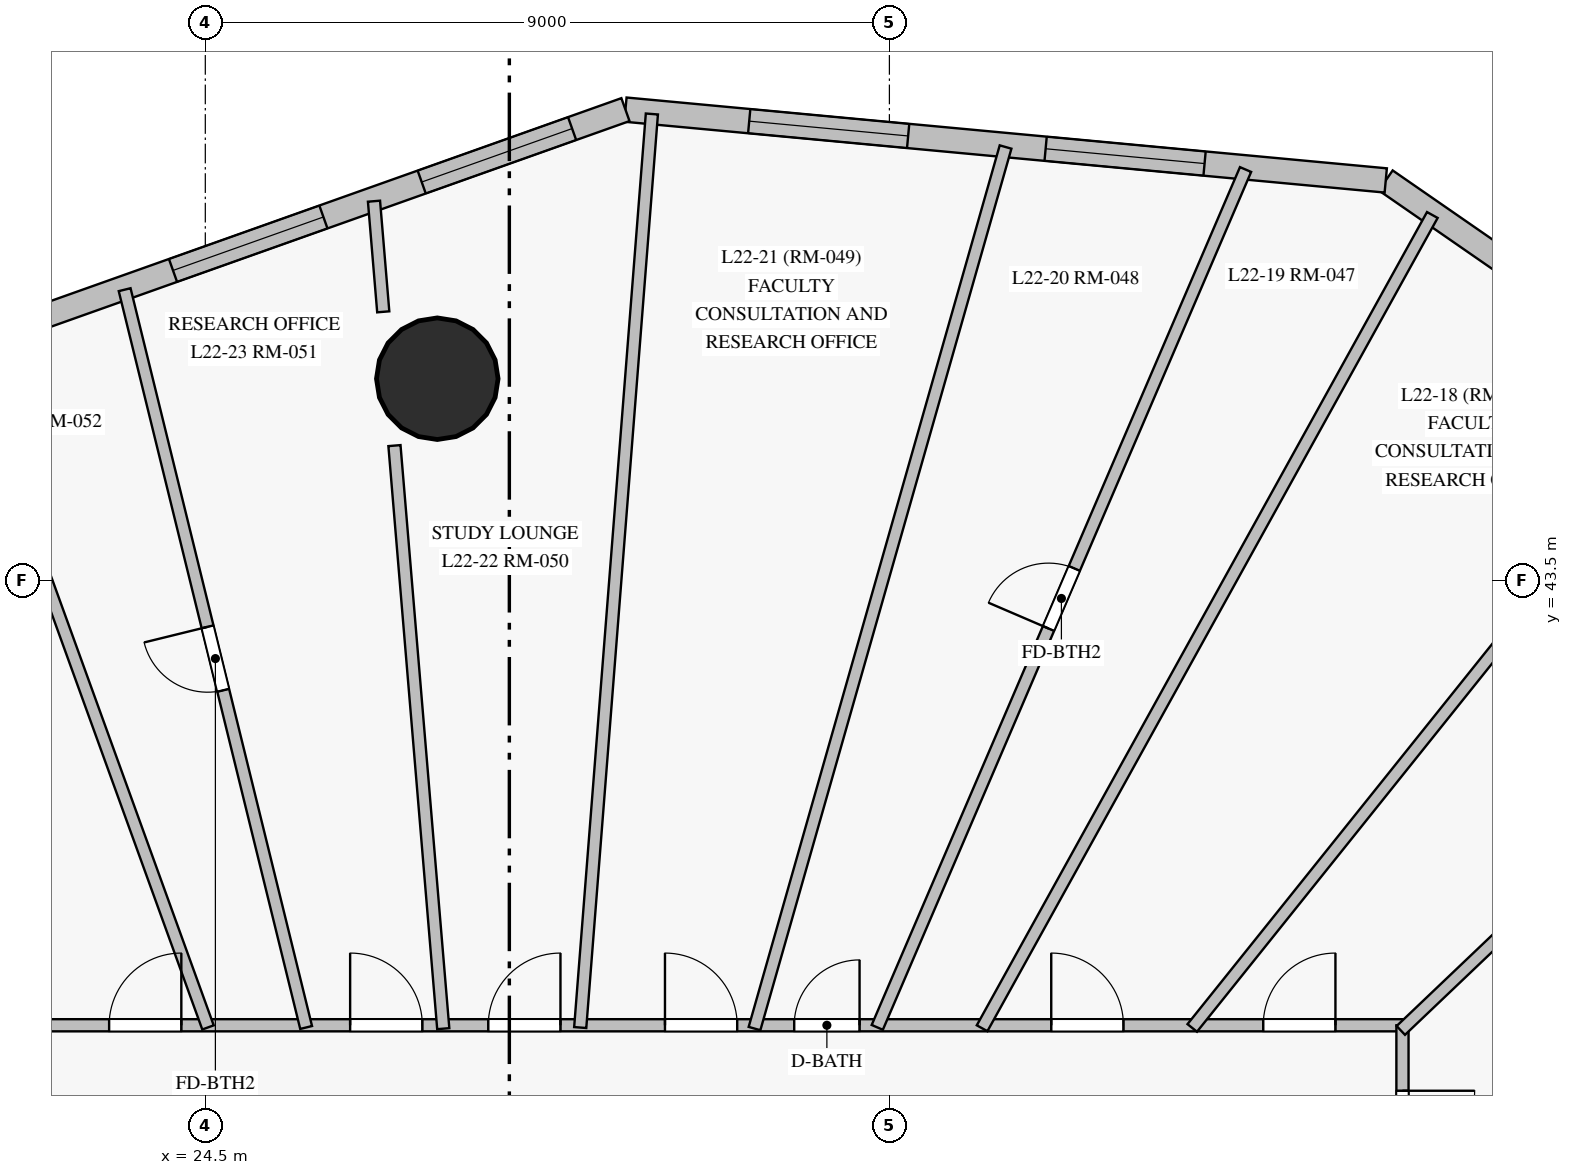
"""IFC4 building model, lengths in metres.
Left out: names, types, materials, properties, quantities, classifications, styles, units other than length and angle.
Written with IfcOpenShell. Run it as: python <this file> out.ifc"""

import sys

from ifc_helpers import new_model, si_unit, direction, frame, frame_2d, origin, origin_with_axes, origin_2d, place, context, subcontext, project, spatial, rectangle, circle, extrude, source, transform, mapped, element, fill, save


model = new_model("IFC4")
c1 = context("Model", 3, precision=1e-05, world=origin(), true_north=direction((0.0, 1.0)))
c2 = subcontext(c1, "Body", "Model", "MODEL_VIEW")
j1 = project(units=[si_unit("LENGTHUNIT", "METRE"), si_unit("PLANEANGLEUNIT", "RADIAN")], contexts=[c1])
p1 = place(None, origin())
s1 = spatial("IfcSite", under=j1, at=p1, CompositionType="ELEMENT")
p2 = place(p1, origin())
s2 = spatial("IfcBuilding", under=s1, at=p2, CompositionType="ELEMENT")
p3 = place(p2, frame((0.0, 0.0, 84.1)))
s3 = spatial("IfcBuildingStorey", under=s2, at=p3, CompositionType="ELEMENT", Elevation=84.1)
m1 = source(origin_with_axes(), c2, "Body", "SweptSolid", [
    extrude(circle(Radius=0.8, at=origin_2d()), origin(), (0.0, 0.0, 1.0), 3.6),
])
p4 = place(p3, frame((27.552, 46.156, 0.0), z_axis=(0.0, 0.0, 1.0), x_axis=(1.0, 0.0, 0.0)))
e1 = element("IfcColumn", 1, at=p4, inside=s3, PredefinedType="COLUMN", context=c2, shape_type="MappedRepresentation", body=[
    mapped(m1, transform((0.0, 0.0, 0.0), scale=1.0)),
])
p5 = place(p3, frame((50.307, 41.653, 0.0), z_axis=(0.0, 0.0, 1.0), x_axis=(-0.822301884345, 0.569051501187, 0.0)))
e2 = element("IfcWall", 2, at=p5, inside=s3, PredefinedType="SOLIDWALL", context=c2, shape_type="SweptSolid", body=[
    extrude(rectangle(XDim=12.498, YDim=0.32, at=frame_2d((6.249, 0.0))), origin(), (0.0, 0.0, 1.0), 3.325),
])
p6 = place(p5, frame((1.102, 0.0, 0.85)))
e3 = element("IfcOpeningElement", 3, at=p6, cuts=e2, PredefinedType="OPENING", context=c2, shape_type="SweptSolid", body=[
    extrude(rectangle(XDim=2.1, YDim=1.95, at=frame_2d((1.05, 0.975))), frame((0.0, 0.17, 0.0), z_axis=(0.0, -1.0, 0.0), x_axis=(1.0, 0.0, 0.0)), (0.0, 0.0, 1.0), 0.34),
])
p7 = place(p5, frame((4.751, 0.0, 0.85)))
e4 = element("IfcOpeningElement", 4, at=p7, cuts=e2, PredefinedType="OPENING", context=c2, shape_type="SweptSolid", body=[
    extrude(rectangle(XDim=2.1, YDim=1.95, at=frame_2d((1.05, 0.975))), frame((0.0, 0.17, 0.0), z_axis=(0.0, -1.0, 0.0), x_axis=(1.0, 0.0, 0.0)), (0.0, 0.0, 1.0), 0.34),
])
p8 = place(p5, frame((8.568, 0.0, 0.85)))
e5 = element("IfcOpeningElement", 5, at=p8, cuts=e2, PredefinedType="OPENING", context=c2, shape_type="SweptSolid", body=[
    extrude(rectangle(XDim=2.1, YDim=1.95, at=frame_2d((1.05, 0.975))), frame((0.0, 0.17, 0.0), z_axis=(0.0, -1.0, 0.0), x_axis=(1.0, 0.0, 0.0)), (0.0, 0.0, 1.0), 0.34),
])
p9 = place(p3, frame((40.03, 48.765, 0.0), z_axis=(0.0, 0.0, 1.0), x_axis=(-0.995690576349, 0.092737673949, 0.0)))
e6 = element("IfcWall", 6, at=p9, inside=s3, PredefinedType="SOLIDWALL", context=c2, shape_type="SweptSolid", body=[
    extrude(rectangle(XDim=10.046, YDim=0.32, at=frame_2d((5.023, 0.0))), origin(), (0.0, 0.0, 1.0), 3.325),
])
p10 = place(p9, frame((2.394, 0.0, 0.85)))
e7 = element("IfcOpeningElement", 7, at=p10, cuts=e6, PredefinedType="OPENING", context=c2, shape_type="SweptSolid", body=[
    extrude(rectangle(XDim=2.1, YDim=1.95, at=frame_2d((1.05, 0.975))), frame((0.0, 0.17, 0.0), z_axis=(0.0, -1.0, 0.0), x_axis=(1.0, 0.0, 0.0)), (0.0, 0.0, 1.0), 0.34),
])
p11 = place(p9, frame((6.311, 0.0, 0.85)))
e8 = element("IfcOpeningElement", 8, at=p11, cuts=e6, PredefinedType="OPENING", context=c2, shape_type="SweptSolid", body=[
    extrude(rectangle(XDim=2.1, YDim=1.95, at=frame_2d((1.05, 0.975))), frame((0.0, 0.17, 0.0), z_axis=(0.0, -1.0, 0.0), x_axis=(1.0, 0.0, 0.0)), (0.0, 0.0, 1.0), 0.34),
])
p12 = place(p3, frame((30.027, 49.696, 0.0), z_axis=(0.0, 0.0, 1.0), x_axis=(-0.942240443112, -0.334937228991, 0.0)))
e9 = element("IfcWall", 9, at=p12, inside=s3, PredefinedType="SOLIDWALL", context=c2, shape_type="SweptSolid", body=[
    extrude(rectangle(XDim=14.562, YDim=0.32, at=frame_2d((7.281, 0.0))), origin(), (0.0, 0.0, 1.0), 3.325),
])
p13 = place(p12, frame((0.745, 0.0, 0.85)))
e10 = element("IfcOpeningElement", 10, at=p13, cuts=e9, PredefinedType="OPENING", context=c2, shape_type="SweptSolid", body=[
    extrude(rectangle(XDim=2.1, YDim=1.95, at=frame_2d((1.05, 0.975))), frame((0.0, 0.17, 0.0), z_axis=(0.0, -1.0, 0.0), x_axis=(1.0, 0.0, 0.0)), (0.0, 0.0, 1.0), 0.34),
])
p14 = place(p12, frame((4.217, 0.0, 0.85)))
e11 = element("IfcOpeningElement", 11, at=p14, cuts=e9, PredefinedType="OPENING", context=c2, shape_type="SweptSolid", body=[
    extrude(rectangle(XDim=2.1, YDim=1.95, at=frame_2d((1.05, 0.975))), frame((0.0, 0.17, 0.0), z_axis=(0.0, -1.0, 0.0), x_axis=(1.0, 0.0, 0.0)), (0.0, 0.0, 1.0), 0.34),
])
p15 = place(p12, frame((10.153, 0.0, 0.85)))
e12 = element("IfcOpeningElement", 12, at=p15, cuts=e9, PredefinedType="OPENING", context=c2, shape_type="SweptSolid", body=[
    extrude(rectangle(XDim=2.1, YDim=1.95, at=frame_2d((1.05, 0.975))), frame((0.0, 0.17, 0.0), z_axis=(0.0, -1.0, 0.0), x_axis=(1.0, 0.0, 0.0)), (0.0, 0.0, 1.0), 0.34),
])
p16 = place(p3, frame((10.5, 37.65, 0.0), z_axis=(0.0, 0.0, 1.0), x_axis=(1.0, 0.0, 0.0)))
e13 = element("IfcWall", 13, at=p16, inside=s3, PredefinedType="PARTITIONING", context=c2, shape_type="SweptSolid", body=[
    extrude(rectangle(XDim=29.75, YDim=0.16, at=frame_2d((14.875, 0.0))), origin(), (0.0, 0.0, 1.0), 2.725),
])
p17 = place(p16, frame((27.918, 0.0, 0.0)))
e14 = element("IfcOpeningElement", 14, at=p17, cuts=e13, PredefinedType="OPENING", context=c2, shape_type="SweptSolid", body=[
    extrude(rectangle(XDim=0.95, YDim=2.15, at=frame_2d((0.475, 1.075))), frame((0.0, 0.09, 0.0), z_axis=(0.0, -1.0, 0.0), x_axis=(1.0, 0.0, 0.0)), (0.0, 0.0, 1.0), 0.18),
])
p18 = place(p16, frame((25.129, 0.0, 0.0)))
e15 = element("IfcOpeningElement", 15, at=p18, cuts=e13, PredefinedType="OPENING", context=c2, shape_type="SweptSolid", body=[
    extrude(rectangle(XDim=0.95, YDim=2.15, at=frame_2d((0.475, 1.075))), frame((0.0, 0.09, 0.0), z_axis=(0.0, -1.0, 0.0), x_axis=(1.0, 0.0, 0.0)), (0.0, 0.0, 1.0), 0.18),
])
p19 = place(p16, frame((21.748, 0.0, 0.0)))
e16 = element("IfcOpeningElement", 16, at=p19, cuts=e13, PredefinedType="OPENING", context=c2, shape_type="SweptSolid", body=[
    extrude(rectangle(XDim=0.86, YDim=2.1, at=frame_2d((0.43, 1.05))), frame((0.0, 0.09, 0.0), z_axis=(0.0, -1.0, 0.0), x_axis=(1.0, 0.0, 0.0)), (0.0, 0.0, 1.0), 0.18),
])
p20 = place(p16, frame((20.048, 0.0, 0.0)))
e17 = element("IfcOpeningElement", 17, at=p20, cuts=e13, PredefinedType="OPENING", context=c2, shape_type="SweptSolid", body=[
    extrude(rectangle(XDim=0.95, YDim=2.15, at=frame_2d((0.475, 1.075))), frame((0.0, 0.09, 0.0), z_axis=(0.0, -1.0, 0.0), x_axis=(1.0, 0.0, 0.0)), (0.0, 0.0, 1.0), 0.18),
])
p21 = place(p16, frame((17.722, 0.0, 0.0)))
e18 = element("IfcOpeningElement", 18, at=p21, cuts=e13, PredefinedType="OPENING", context=c2, shape_type="SweptSolid", body=[
    extrude(rectangle(XDim=0.95, YDim=2.15, at=frame_2d((0.475, 1.075))), frame((0.0, 0.09, 0.0), z_axis=(0.0, -1.0, 0.0), x_axis=(1.0, 0.0, 0.0)), (0.0, 0.0, 1.0), 0.18),
])
p22 = place(p16, frame((15.906, 0.0, 0.0)))
e19 = element("IfcOpeningElement", 19, at=p22, cuts=e13, PredefinedType="OPENING", context=c2, shape_type="SweptSolid", body=[
    extrude(rectangle(XDim=0.95, YDim=2.15, at=frame_2d((0.475, 1.075))), frame((0.0, 0.09, 0.0), z_axis=(0.0, -1.0, 0.0), x_axis=(1.0, 0.0, 0.0)), (0.0, 0.0, 1.0), 0.18),
])
p23 = place(p16, frame((12.735, 0.0, 0.0)))
e20 = element("IfcOpeningElement", 20, at=p23, cuts=e13, PredefinedType="OPENING", context=c2, shape_type="SweptSolid", body=[
    extrude(rectangle(XDim=0.95, YDim=2.15, at=frame_2d((0.475, 1.075))), frame((0.0, 0.09, 0.0), z_axis=(0.0, -1.0, 0.0), x_axis=(1.0, 0.0, 0.0)), (0.0, 0.0, 1.0), 0.18),
])
p24 = place(p16, frame((10.11, 0.0, 0.0)))
e21 = element("IfcOpeningElement", 21, at=p24, cuts=e13, PredefinedType="OPENING", context=c2, shape_type="SweptSolid", body=[
    extrude(rectangle(XDim=0.95, YDim=2.15, at=frame_2d((0.475, 1.075))), frame((0.0, 0.09, 0.0), z_axis=(0.0, -1.0, 0.0), x_axis=(1.0, 0.0, 0.0)), (0.0, 0.0, 1.0), 0.18),
])
p25 = place(p16, frame((8.99, 0.0, 0.0)))
e22 = element("IfcOpeningElement", 22, at=p25, cuts=e13, PredefinedType="OPENING", context=c2, shape_type="SweptSolid", body=[
    extrude(rectangle(XDim=0.95, YDim=2.15, at=frame_2d((0.475, 1.075))), frame((0.0, 0.09, 0.0), z_axis=(0.0, -1.0, 0.0), x_axis=(1.0, 0.0, 0.0)), (0.0, 0.0, 1.0), 0.18),
])
p26 = place(p16, frame((7.897, 0.0, 0.0)))
e23 = element("IfcOpeningElement", 23, at=p26, cuts=e13, PredefinedType="OPENING", context=c2, shape_type="SweptSolid", body=[
    extrude(rectangle(XDim=0.95, YDim=2.15, at=frame_2d((0.475, 1.075))), frame((0.0, 0.09, 0.0), z_axis=(0.0, -1.0, 0.0), x_axis=(1.0, 0.0, 0.0)), (0.0, 0.0, 1.0), 0.18),
])
p27 = place(p3, frame((40.25, 37.65, 0.0), z_axis=(0.0, 0.0, 1.0), x_axis=(0.0, -1.0, 0.0)))
e24 = element("IfcWall", 24, at=p27, inside=s3, PredefinedType="PARTITIONING", context=c2, shape_type="SweptSolid", body=[
    extrude(rectangle(XDim=22.3, YDim=0.16, at=frame_2d((11.15, 0.0))), origin(), (0.0, 0.0, 1.0), 2.725),
])
p28 = place(p27, frame((16.25, 0.0, 0.0)))
e25 = element("IfcOpeningElement", 25, at=p28, cuts=e24, PredefinedType="OPENING", context=c2, shape_type="SweptSolid", body=[
    extrude(rectangle(XDim=0.95, YDim=2.15, at=frame_2d((0.475, 1.075))), frame((0.0, 0.09, 0.0), z_axis=(0.0, -1.0, 0.0), x_axis=(1.0, 0.0, 0.0)), (0.0, 0.0, 1.0), 0.18),
])
p29 = place(p27, frame((11.165, 0.0, 0.0)))
e26 = element("IfcOpeningElement", 26, at=p29, cuts=e24, PredefinedType="OPENING", context=c2, shape_type="SweptSolid", body=[
    extrude(rectangle(XDim=0.95, YDim=2.15, at=frame_2d((0.475, 1.075))), frame((0.0, 0.09, 0.0), z_axis=(0.0, -1.0, 0.0), x_axis=(1.0, 0.0, 0.0)), (0.0, 0.0, 1.0), 0.18),
])
p30 = place(p27, frame((9.513, 0.0, 0.0)))
e27 = element("IfcOpeningElement", 27, at=p30, cuts=e24, PredefinedType="OPENING", context=c2, shape_type="SweptSolid", body=[
    extrude(rectangle(XDim=0.95, YDim=2.15, at=frame_2d((0.475, 1.075))), frame((0.0, 0.09, 0.0), z_axis=(0.0, -1.0, 0.0), x_axis=(1.0, 0.0, 0.0)), (0.0, 0.0, 1.0), 0.18),
])
p31 = place(p27, frame((6.94, 0.0, 0.0)))
e28 = element("IfcOpeningElement", 28, at=p31, cuts=e24, PredefinedType="OPENING", context=c2, shape_type="SweptSolid", body=[
    extrude(rectangle(XDim=0.95, YDim=2.15, at=frame_2d((0.475, 1.075))), frame((0.0, 0.09, 0.0), z_axis=(0.0, -1.0, 0.0), x_axis=(1.0, 0.0, 0.0)), (0.0, 0.0, 1.0), 0.18),
])
p32 = place(p27, frame((3.677, 0.0, 0.0)))
e29 = element("IfcOpeningElement", 29, at=p32, cuts=e24, PredefinedType="OPENING", context=c2, shape_type="SweptSolid", body=[
    extrude(rectangle(XDim=0.95, YDim=2.15, at=frame_2d((0.475, 1.075))), frame((0.0, 0.09, 0.0), z_axis=(0.0, -1.0, 0.0), x_axis=(1.0, 0.0, 0.0)), (0.0, 0.0, 1.0), 0.18),
])
p33 = place(p27, frame((0.862, 0.0, 0.0)))
e30 = element("IfcOpeningElement", 30, at=p33, cuts=e24, PredefinedType="OPENING", context=c2, shape_type="SweptSolid", body=[
    extrude(rectangle(XDim=0.95, YDim=2.15, at=frame_2d((0.475, 1.075))), frame((0.0, 0.09, 0.0), z_axis=(0.0, -1.0, 0.0), x_axis=(1.0, 0.0, 0.0)), (0.0, 0.0, 1.0), 0.18),
])
p34 = place(p3, frame((40.223, 32.01, 0.0), z_axis=(0.0, 0.0, 1.0), x_axis=(0.903036353233, 0.429564133443, 0.0)))
e31 = element("IfcWall", 31, at=p34, inside=s3, PredefinedType="PARTITIONING", context=c2, shape_type="SweptSolid", body=[
    extrude(rectangle(XDim=12.288, YDim=0.16, at=frame_2d((6.144, 0.0))), origin(), (0.0, 0.0, 1.0), 3.325),
])
p35 = place(p3, frame((33.34, 37.622, 0.0), z_axis=(0.0, 0.0, 1.0), x_axis=(0.394497394223, 0.918897059496, 0.0)))
e32 = element("IfcWall", 32, at=p35, inside=s3, PredefinedType="PARTITIONING", context=c2, shape_type="SweptSolid", body=[
    extrude(rectangle(XDim=12.282, YDim=0.16, at=frame_2d((6.141, 0.0))), origin(), (0.0, 0.0, 1.0), 3.325),
])
p36 = place(p35, frame((5.711, 0.0, 0.0)))
e33 = element("IfcOpeningElement", 33, at=p36, cuts=e32, PredefinedType="OPENING", context=c2, shape_type="SweptSolid", body=[
    extrude(rectangle(XDim=0.86, YDim=2.04, at=frame_2d((0.43, 1.02))), frame((0.0, 0.09, 0.0), z_axis=(0.0, -1.0, 0.0), x_axis=(1.0, 0.0, 0.0)), (0.0, 0.0, 1.0), 0.18),
])
p37 = place(p3, frame((34.719, 37.611, 0.0), z_axis=(0.0, 0.0, 1.0), x_axis=(0.484350809967, 0.874873872558, 0.0)))
e34 = element("IfcWall", 34, at=p37, inside=s3, PredefinedType="PARTITIONING", context=c2, shape_type="SweptSolid", body=[
    extrude(rectangle(XDim=12.229, YDim=0.16, at=frame_2d((6.115, 0.0))), origin(), (0.0, 0.0, 1.0), 3.325),
])
p38 = place(p3, frame((40.213, 34.719, 0.0), z_axis=(0.0, 0.0, 1.0), x_axis=(0.816182001631, 0.577794894589, 0.0)))
e35 = element("IfcWall", 35, at=p38, inside=s3, PredefinedType="PARTITIONING", context=c2, shape_type="SweptSolid", body=[
    extrude(rectangle(XDim=12.151, YDim=0.16, at=frame_2d((6.076, 0.0))), origin(), (0.0, 0.0, 1.0), 3.325),
])
p39 = place(p3, frame((29.432, 37.62, 0.0), z_axis=(0.0, 0.0, 1.0), x_axis=(0.078190850659, 0.996938408766, 0.0)))
e36 = element("IfcWall", 36, at=p39, inside=s3, PredefinedType="PARTITIONING", context=c2, shape_type="SweptSolid", body=[
    extrude(rectangle(XDim=12.055, YDim=0.16, at=frame_2d((6.028, 0.0))), origin(), (0.0, 0.0, 1.0), 3.325),
])
p40 = place(p3, frame((31.726, 37.607, 0.0), z_axis=(0.0, 0.0, 1.0), x_axis=(0.273886739983, 0.9617619527, 0.0)))
e37 = element("IfcWall", 37, at=p40, inside=s3, PredefinedType="PARTITIONING", context=c2, shape_type="SweptSolid", body=[
    extrude(rectangle(XDim=12.059, YDim=0.16, at=frame_2d((6.029, 0.0))), origin(), (0.0, 0.0, 1.0), 3.325),
])
p41 = place(p3, frame((37.484, 37.615, 0.0), z_axis=(0.0, 0.0, 1.0), x_axis=(0.625362175686, 0.780334639255, 0.0)))
e38 = element("IfcWall", 38, at=p41, inside=s3, PredefinedType="PARTITIONING", context=c2, shape_type="SweptSolid", body=[
    extrude(rectangle(XDim=10.618, YDim=0.16, at=frame_2d((5.309, 0.0))), origin(), (0.0, 0.0, 1.0), 3.325),
])
p42 = place(p3, frame((25.826, 37.621, 0.0), z_axis=(0.0, 0.0, 1.0), x_axis=(-0.238844378247, 0.971057857689, 0.0)))
e39 = element("IfcWall", 39, at=p42, inside=s3, PredefinedType="PARTITIONING", context=c2, shape_type="SweptSolid", body=[
    extrude(rectangle(XDim=9.996, YDim=0.16, at=frame_2d((4.998, 0.0))), origin(), (0.0, 0.0, 1.0), 3.325),
])
p43 = place(p42, frame((4.568, 0.0, 0.0)))
e40 = element("IfcOpeningElement", 40, at=p43, cuts=e39, PredefinedType="OPENING", context=c2, shape_type="SweptSolid", body=[
    extrude(rectangle(XDim=0.86, YDim=2.04, at=frame_2d((0.43, 1.02))), frame((0.0, 0.09, 0.0), z_axis=(0.0, -1.0, 0.0), x_axis=(1.0, 0.0, 0.0)), (0.0, 0.0, 1.0), 0.18),
])
p44 = place(p3, frame((24.535, 37.622, 0.0), z_axis=(0.0, 0.0, 1.0), x_axis=(-0.340568222743, 0.940219807097, 0.0)))
e41 = element("IfcWall", 41, at=p44, inside=s3, PredefinedType="PARTITIONING", context=c2, shape_type="SweptSolid", body=[
    extrude(rectangle(XDim=9.513, YDim=0.16, at=frame_2d((4.756, 0.0))), origin(), (0.0, 0.0, 1.0), 3.325),
])
p45 = place(p3, frame((40.228, 37.582, 0.0), z_axis=(0.0, 0.0, 1.0), x_axis=(0.724299857795, 0.689485109337, 0.0)))
e42 = element("IfcWall", 42, at=p45, inside=s3, PredefinedType="PARTITIONING", context=c2, shape_type="SweptSolid", body=[
    extrude(rectangle(XDim=9.25, YDim=0.16, at=frame_2d((4.625, 0.0))), origin(), (0.0, 0.0, 1.0), 3.325),
])
p46 = place(p3, frame((27.631, 37.605, 0.0), z_axis=(0.0, 0.0, 1.0), x_axis=(-0.083415578121, 0.996514847519, 0.0)))
e43 = element("IfcWall", 43, at=p46, inside=s3, PredefinedType="PARTITIONING", context=c2, shape_type="SweptSolid", body=[
    extrude(rectangle(XDim=7.698, YDim=0.16, at=frame_2d((3.849, 0.0))), origin(), (0.0, 0.0, 1.0), 2.675),
])
p47 = place(p3, frame((26.841, 47.036, 0.0), z_axis=(0.0, 0.0, 1.0), x_axis=(-0.083405123378, 0.996515722603, 0.0)))
e44 = element("IfcWall", 44, at=p47, inside=s3, PredefinedType="PARTITIONING", context=c2, shape_type="SweptSolid", body=[
    extrude(rectangle(XDim=1.461, YDim=0.16, at=frame_2d((0.73, 0.0))), origin(), (0.0, 0.0, 1.0), 3.325),
])
m2 = source(origin_with_axes(), c2, "Body", "SweptSolid", [
    extrude(rectangle(XDim=2.1, YDim=1.95, at=frame_2d((1.05, 0.975))), frame((0.0, 0.03, 0.0), z_axis=(0.0, -1.0, 0.0), x_axis=(1.0, 0.0, 0.0)), (0.0, 0.0, 1.0), 0.06),
])
p48 = place(p10, origin())
e45 = element("IfcWindow", 45, at=p48, inside=s3, PartitioningType="SINGLE_PANEL", PredefinedType="WINDOW", context=c2, shape_type="MappedRepresentation", body=[
    mapped(m2, transform((0.0, 0.0, 0.0), scale=1.0)),
])
fill(e7, e45)
p49 = place(p11, origin())
e46 = element("IfcWindow", 46, at=p49, inside=s3, PartitioningType="SINGLE_PANEL", PredefinedType="WINDOW", context=c2, shape_type="MappedRepresentation", body=[
    mapped(m2, transform((0.0, 0.0, 0.0), scale=1.0)),
])
fill(e8, e46)
p50 = place(p13, origin())
e47 = element("IfcWindow", 47, at=p50, inside=s3, PartitioningType="SINGLE_PANEL", PredefinedType="WINDOW", context=c2, shape_type="MappedRepresentation", body=[
    mapped(m2, transform((0.0, 0.0, 0.0), scale=1.0)),
])
fill(e10, e47)
p51 = place(p14, origin())
e48 = element("IfcWindow", 48, at=p51, inside=s3, PartitioningType="SINGLE_PANEL", PredefinedType="WINDOW", context=c2, shape_type="MappedRepresentation", body=[
    mapped(m2, transform((0.0, 0.0, 0.0), scale=1.0)),
])
fill(e11, e48)
m3 = source(origin_with_axes(), c2, "Body", "SweptSolid", [
    extrude(rectangle(XDim=0.95, YDim=2.15, at=frame_2d((0.475, 1.075))), frame((0.0, 0.025, 0.0), z_axis=(0.0, -1.0, 0.0), x_axis=(1.0, 0.0, 0.0)), (0.0, 0.0, 1.0), 0.05),
])
p52 = place(p33, origin())
e49 = element("IfcDoor", 49, at=p52, inside=s3, OperationType="SINGLE_SWING_LEFT", PredefinedType="DOOR", context=c2, shape_type="MappedRepresentation", body=[
    mapped(m3, transform((0.0, 0.0, 0.0), scale=1.0)),
])
fill(e30, e49)
p53 = place(p17, origin())
e50 = element("IfcDoor", 50, at=p53, inside=s3, OperationType="SINGLE_SWING_RIGHT", PredefinedType="DOOR", context=c2, shape_type="MappedRepresentation", body=[
    mapped(m3, transform((0.0, 0.0, 0.0), scale=1.0)),
])
fill(e14, e50)
p54 = place(p18, origin())
e51 = element("IfcDoor", 51, at=p54, inside=s3, OperationType="SINGLE_SWING_LEFT", PredefinedType="DOOR", context=c2, shape_type="MappedRepresentation", body=[
    mapped(m3, transform((0.0, 0.0, 0.0), scale=1.0)),
])
fill(e15, e51)
m4 = source(origin_with_axes(), c2, "Body", "SweptSolid", [
    extrude(rectangle(XDim=0.86, YDim=2.1, at=frame_2d((0.43, 1.05))), frame((0.0, 0.025, 0.0), z_axis=(0.0, -1.0, 0.0), x_axis=(1.0, 0.0, 0.0)), (0.0, 0.0, 1.0), 0.05),
])
p55 = place(p19, origin())
e52 = element("IfcDoor", 52, at=p55, inside=s3, OperationType="SINGLE_SWING_RIGHT", PredefinedType="DOOR", context=c2, shape_type="MappedRepresentation", body=[
    mapped(m4, transform((0.0, 0.0, 0.0), scale=1.0)),
])
fill(e16, e52)
p56 = place(p20, origin())
e53 = element("IfcDoor", 53, at=p56, inside=s3, OperationType="SINGLE_SWING_LEFT", PredefinedType="DOOR", context=c2, shape_type="MappedRepresentation", body=[
    mapped(m3, transform((0.0, 0.0, 0.0), scale=1.0)),
])
fill(e17, e53)
p57 = place(p21, origin())
e54 = element("IfcDoor", 54, at=p57, inside=s3, OperationType="SINGLE_SWING_RIGHT", PredefinedType="DOOR", context=c2, shape_type="MappedRepresentation", body=[
    mapped(m3, transform((0.0, 0.0, 0.0), scale=1.0)),
])
fill(e18, e54)
p58 = place(p22, origin())
e55 = element("IfcDoor", 55, at=p58, inside=s3, OperationType="SINGLE_SWING_LEFT", PredefinedType="DOOR", context=c2, shape_type="MappedRepresentation", body=[
    mapped(m3, transform((0.0, 0.0, 0.0), scale=1.0)),
])
fill(e19, e55)
p59 = place(p23, origin())
e56 = element("IfcDoor", 56, at=p59, inside=s3, OperationType="SINGLE_SWING_RIGHT", PredefinedType="DOOR", context=c2, shape_type="MappedRepresentation", body=[
    mapped(m3, transform((0.0, 0.0, 0.0), scale=1.0)),
])
fill(e20, e56)
m5 = source(origin_with_axes(), c2, "Body", "SweptSolid", [
    extrude(rectangle(XDim=0.86, YDim=2.04, at=frame_2d((0.43, 1.02))), frame((0.0, 0.025, 0.0), z_axis=(0.0, -1.0, 0.0), x_axis=(1.0, 0.0, 0.0)), (0.0, 0.0, 1.0), 0.05),
])
p60 = place(p36, origin())
e57 = element("IfcDoor", 57, at=p60, inside=s3, OperationType="SINGLE_SWING_LEFT", PredefinedType="DOOR", context=c2, shape_type="MappedRepresentation", body=[
    mapped(m5, transform((0.0, 0.0, 0.0), scale=1.0)),
])
fill(e33, e57)
p61 = place(p43, origin())
e58 = element("IfcDoor", 58, at=p61, inside=s3, OperationType="SINGLE_SWING_RIGHT", PredefinedType="DOOR", context=c2, shape_type="MappedRepresentation", body=[
    mapped(m5, transform((0.0, 0.0, 0.0), scale=1.0)),
])
fill(e40, e58)
save(model, sys.argv[1])
